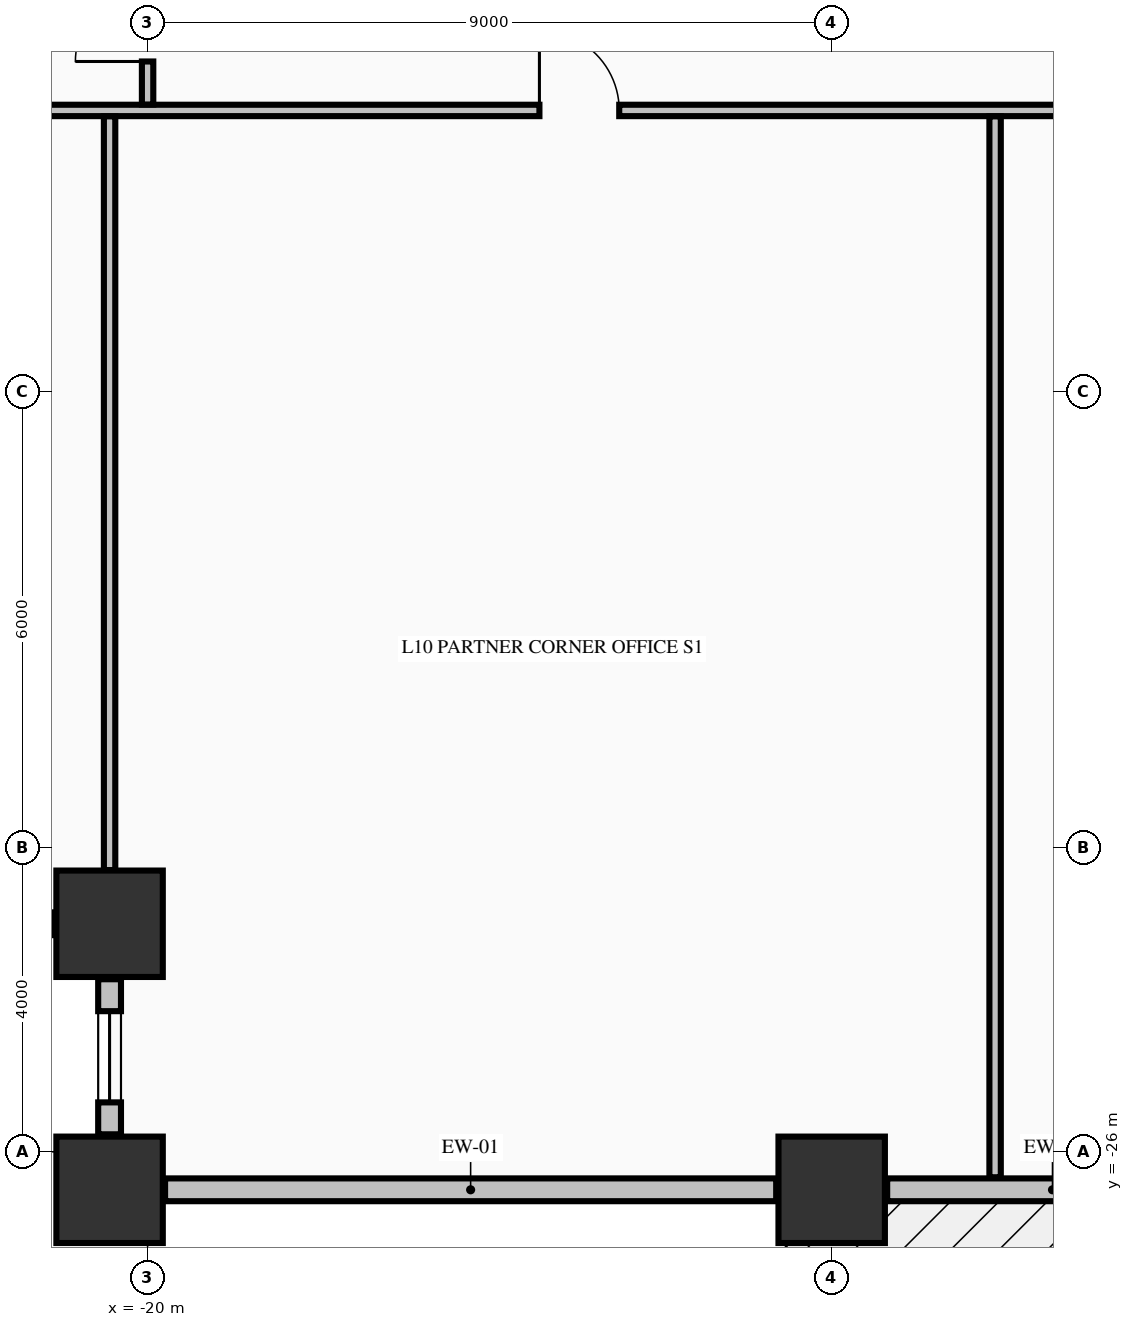
"""IFC4 building model, lengths in metres.
Left out: names, types, materials, properties, quantities, classifications, styles, units other than length and angle.
Written with IfcOpenShell. Run it as: python <this file> out.ifc"""

import sys

from ifc_helpers import new_model, si_unit, direction, frame, frame_2d, origin, origin_2d, place, context, subcontext, project, spatial, rectangle, extrude, element, fill, save


model = new_model("IFC4")
c1 = context("Model", 3, precision=1e-05, world=origin(), true_north=direction((0.0, 1.0)))
c2 = subcontext(c1, "Body", "Model", "MODEL_VIEW")
j1 = project(units=[si_unit("LENGTHUNIT", "METRE"), si_unit("PLANEANGLEUNIT", "RADIAN")], contexts=[c1])
p1 = place(None, origin())
s1 = spatial("IfcSite", under=j1, at=p1, CompositionType="ELEMENT")
p2 = place(p1, origin())
s2 = spatial("IfcBuilding", under=s1, at=p2, CompositionType="ELEMENT")
p3 = place(p2, frame((0.0, 0.0, 45.05)))
s3 = spatial("IfcBuildingStorey", under=s2, at=p3, CompositionType="ELEMENT", Elevation=45.05)
for number, where, z_axis, x_axis in (
    (1, (-20.5, -26.5, -0.25), (0.0, 0.0, 1.0), (1.0, 0.0, 0.0)),
    (2, (-11.0, -26.5, -0.25), (0.0, 0.0, 1.0), (1.0, 0.0, 0.0)),
    (3, (-20.5, -23.0, -0.25), (0.0, 0.0, 1.0), (1.0, 0.0, 0.0)),
):
    element("IfcColumn", number, at=place(p3, frame(where, z_axis=z_axis, x_axis=x_axis)), inside=s3, PredefinedType="COLUMN", context=c2, shape_type="SweptSolid", body=[
        extrude(rectangle(XDim=1.4, YDim=1.4, at=origin_2d()), origin(), (0.0, 0.0, 1.0), 3.57),
    ])
p4 = place(p3, frame((-23.27, -23.0, 0.0), z_axis=(0.0, 0.0, 1.0), x_axis=(1.0, 0.0, 0.0)))
e4 = element("IfcWall", 4, at=p4, inside=s3, PredefinedType="STANDARD", context=c2, shape_type="SweptSolid", body=[
    extrude(rectangle(XDim=2.04, YDim=0.3, at=frame_2d((1.02, 0.0))), origin(), (0.0, 0.0, 1.0), 2.712),
])
p5 = place(p4, frame((0.42, 0.0, 0.82)))
e5 = element("IfcOpeningElement", 5, at=p5, cuts=e4, PredefinedType="OPENING", context=c2, shape_type="SweptSolid", body=[
    extrude(rectangle(XDim=1.2, YDim=1.65, at=frame_2d((0.6, 0.825))), frame((0.0, 0.16, 0.0), z_axis=(0.0, -1.0, 0.0), x_axis=(1.0, 0.0, 0.0)), (0.0, 0.0, 1.0), 0.32),
])
p6 = place(p3, frame((-20.5, -23.73, 0.0), z_axis=(0.0, 0.0, 1.0), x_axis=(0.0, -1.0, 0.0)))
e6 = element("IfcWall", 6, at=p6, inside=s3, PredefinedType="STANDARD", context=c2, shape_type="SweptSolid", body=[
    extrude(rectangle(XDim=2.04, YDim=0.3, at=frame_2d((1.02, 0.0))), origin(), (0.0, 0.0, 1.0), 2.712),
])
p7 = place(p6, frame((0.42, 0.0, 0.82)))
e7 = element("IfcOpeningElement", 7, at=p7, cuts=e6, PredefinedType="OPENING", context=c2, shape_type="SweptSolid", body=[
    extrude(rectangle(XDim=1.2, YDim=1.65, at=frame_2d((0.6, 0.825))), frame((0.0, 0.16, 0.0), z_axis=(0.0, -1.0, 0.0), x_axis=(1.0, 0.0, 0.0)), (0.0, 0.0, 1.0), 0.32),
])
p8 = place(p3, frame((-19.77, -26.5, 0.0), z_axis=(0.0, 0.0, 1.0), x_axis=(1.0, 0.0, 0.0)))
e8 = element("IfcWall", 8, at=p8, inside=s3, PredefinedType="STANDARD", context=c2, shape_type="SweptSolid", body=[
    extrude(rectangle(XDim=8.04, YDim=0.3, at=frame_2d((4.02, 0.0))), origin(), (0.0, 0.0, 1.0), 2.712),
])
p9 = place(p3, frame((-10.27, -26.5, 0.0), z_axis=(0.0, 0.0, 1.0), x_axis=(1.0, 0.0, 0.0)))
e9 = element("IfcWall", 9, at=p9, inside=s3, PredefinedType="STANDARD", context=c2, shape_type="SweptSolid", body=[
    extrude(rectangle(XDim=9.54, YDim=0.3, at=frame_2d((4.77, 0.0))), origin(), (0.0, 0.0, 1.0), 2.712),
])
p10 = place(p9, frame((7.235, 0.0, 0.0)))
e10 = element("IfcOpeningElement", 10, at=p10, cuts=e9, PredefinedType="OPENING", context=c2, shape_type="SweptSolid", body=[
    extrude(rectangle(XDim=1.1, YDim=2.15, at=frame_2d((0.55, 1.075))), frame((0.0, 0.16, 0.0), z_axis=(0.0, -1.0, 0.0), x_axis=(1.0, 0.0, 0.0)), (0.0, 0.0, 1.0), 0.32),
])
p11 = place(p9, frame((3.87, 0.0, 0.78)))
e11 = element("IfcOpeningElement", 11, at=p11, cuts=e9, PredefinedType="OPENING", context=c2, shape_type="SweptSolid", body=[
    extrude(rectangle(XDim=1.8, YDim=1.72, at=frame_2d((0.9, 0.86))), frame((0.0, 0.16, 0.0), z_axis=(0.0, -1.0, 0.0), x_axis=(1.0, 0.0, 0.0)), (0.0, 0.0, 1.0), 0.32),
])
p12 = place(p3, frame((-23.835, -12.3, 0.0), z_axis=(0.0, 0.0, 1.0), x_axis=(1.0, 0.0, 0.0)))
e12 = element("IfcWall", 12, at=p12, inside=s3, PredefinedType="PARTITIONING", context=c2, shape_type="SweptSolid", body=[
    extrude(rectangle(XDim=52.67, YDim=0.15, at=frame_2d((26.335, 0.0))), origin(), (0.0, 0.0, 1.0), 3.32),
])
p13 = place(p12, frame((8.99, 0.0, 0.0)))
e13 = element("IfcOpeningElement", 13, at=p13, cuts=e12, PredefinedType="OPENING", context=c2, shape_type="SweptSolid", body=[
    extrude(rectangle(XDim=1.05, YDim=2.15, at=frame_2d((0.525, 1.075))), frame((0.0, 0.085, 0.0), z_axis=(0.0, -1.0, 0.0), x_axis=(1.0, 0.0, 0.0)), (0.0, 0.0, 1.0), 0.17),
])
p14 = place(p12, frame((20.96, 0.0, 0.0)))
e14 = element("IfcOpeningElement", 14, at=p14, cuts=e12, PredefinedType="OPENING", context=c2, shape_type="SweptSolid", body=[
    extrude(rectangle(XDim=1.05, YDim=2.15, at=frame_2d((0.525, 1.075))), frame((0.0, 0.085, 0.0), z_axis=(0.0, -1.0, 0.0), x_axis=(1.0, 0.0, 0.0)), (0.0, 0.0, 1.0), 0.17),
])
p15 = place(p12, frame((29.11, 0.0, 0.0)))
e15 = element("IfcOpeningElement", 15, at=p15, cuts=e12, PredefinedType="OPENING", context=c2, shape_type="SweptSolid", body=[
    extrude(rectangle(XDim=1.05, YDim=2.15, at=frame_2d((0.525, 1.075))), frame((0.0, 0.085, 0.0), z_axis=(0.0, -1.0, 0.0), x_axis=(1.0, 0.0, 0.0)), (0.0, 0.0, 1.0), 0.17),
])
p16 = place(p3, frame((-20.5, -22.294, 0.0), z_axis=(0.0, 0.0, 1.0), x_axis=(0.0, 1.0, 0.0)))
e16 = element("IfcWall", 16, at=p16, inside=s3, PredefinedType="PARTITIONING", context=c2, shape_type="SweptSolid", body=[
    extrude(rectangle(XDim=9.916, YDim=0.15, at=frame_2d((4.958, 0.0))), origin(), (0.0, 0.0, 1.0), 3.32),
])
p17 = place(p3, frame((-20.0, -12.222, 0.0), z_axis=(0.0, 0.0, 1.0), x_axis=(0.0, 1.0, 0.0)))
e17 = element("IfcWall", 17, at=p17, inside=s3, PredefinedType="PARTITIONING", context=c2, shape_type="SweptSolid", body=[
    extrude(rectangle(XDim=1.666, YDim=0.15, at=frame_2d((0.833, 0.0))), origin(), (0.0, 0.0, 1.0), 3.32),
])
p18 = place(p17, frame((0.566, 0.0, 0.0)))
e18 = element("IfcOpeningElement", 18, at=p18, cuts=e17, PredefinedType="OPENING", context=c2, shape_type="SweptSolid", body=[
    extrude(rectangle(XDim=0.95, YDim=2.15, at=frame_2d((0.475, 1.075))), frame((0.0, 0.085, 0.0), z_axis=(0.0, -1.0, 0.0), x_axis=(1.0, 0.0, 0.0)), (0.0, 0.0, 1.0), 0.17),
])
p19 = place(p3, frame((-8.85, -26.335, 0.0), z_axis=(0.0, 0.0, 1.0), x_axis=(0.0, 1.0, 0.0)))
e19 = element("IfcWall", 19, at=p19, inside=s3, PredefinedType="PARTITIONING", context=c2, shape_type="SweptSolid", body=[
    extrude(rectangle(XDim=13.957, YDim=0.15, at=frame_2d((6.979, 0.0))), origin(), (0.0, 0.0, 1.0), 3.32),
])
p20 = place(p7, origin())
e20 = element("IfcWindow", 20, at=p20, inside=s3, PartitioningType="SINGLE_PANEL", PredefinedType="WINDOW", context=c2, shape_type="SweptSolid", body=[
    extrude(rectangle(XDim=1.2, YDim=1.65, at=frame_2d((0.6, 0.825))), frame((0.0, 0.03, 0.0), z_axis=(0.0, -1.0, 0.0), x_axis=(1.0, 0.0, 0.0)), (0.0, 0.0, 1.0), 0.06),
])
fill(e7, e20)
p21 = place(p13, origin())
e21 = element("IfcDoor", 21, at=p21, inside=s3, OperationType="SINGLE_SWING_LEFT", PredefinedType="DOOR", context=c2, shape_type="SweptSolid", body=[
    extrude(rectangle(XDim=1.05, YDim=2.15, at=frame_2d((0.525, 1.075))), frame((0.0, 0.025, 0.0), z_axis=(0.0, -1.0, 0.0), x_axis=(1.0, 0.0, 0.0)), (0.0, 0.0, 1.0), 0.05),
])
fill(e13, e21)
p22 = place(p18, origin())
e22 = element("IfcDoor", 22, at=p22, inside=s3, OperationType="SINGLE_SWING_LEFT", PredefinedType="DOOR", context=c2, shape_type="SweptSolid", body=[
    extrude(rectangle(XDim=0.95, YDim=2.15, at=frame_2d((0.475, 1.075))), frame((0.0, 0.025, 0.0), z_axis=(0.0, -1.0, 0.0), x_axis=(1.0, 0.0, 0.0)), (0.0, 0.0, 1.0), 0.05),
])
fill(e18, e22)
save(model, sys.argv[1])
